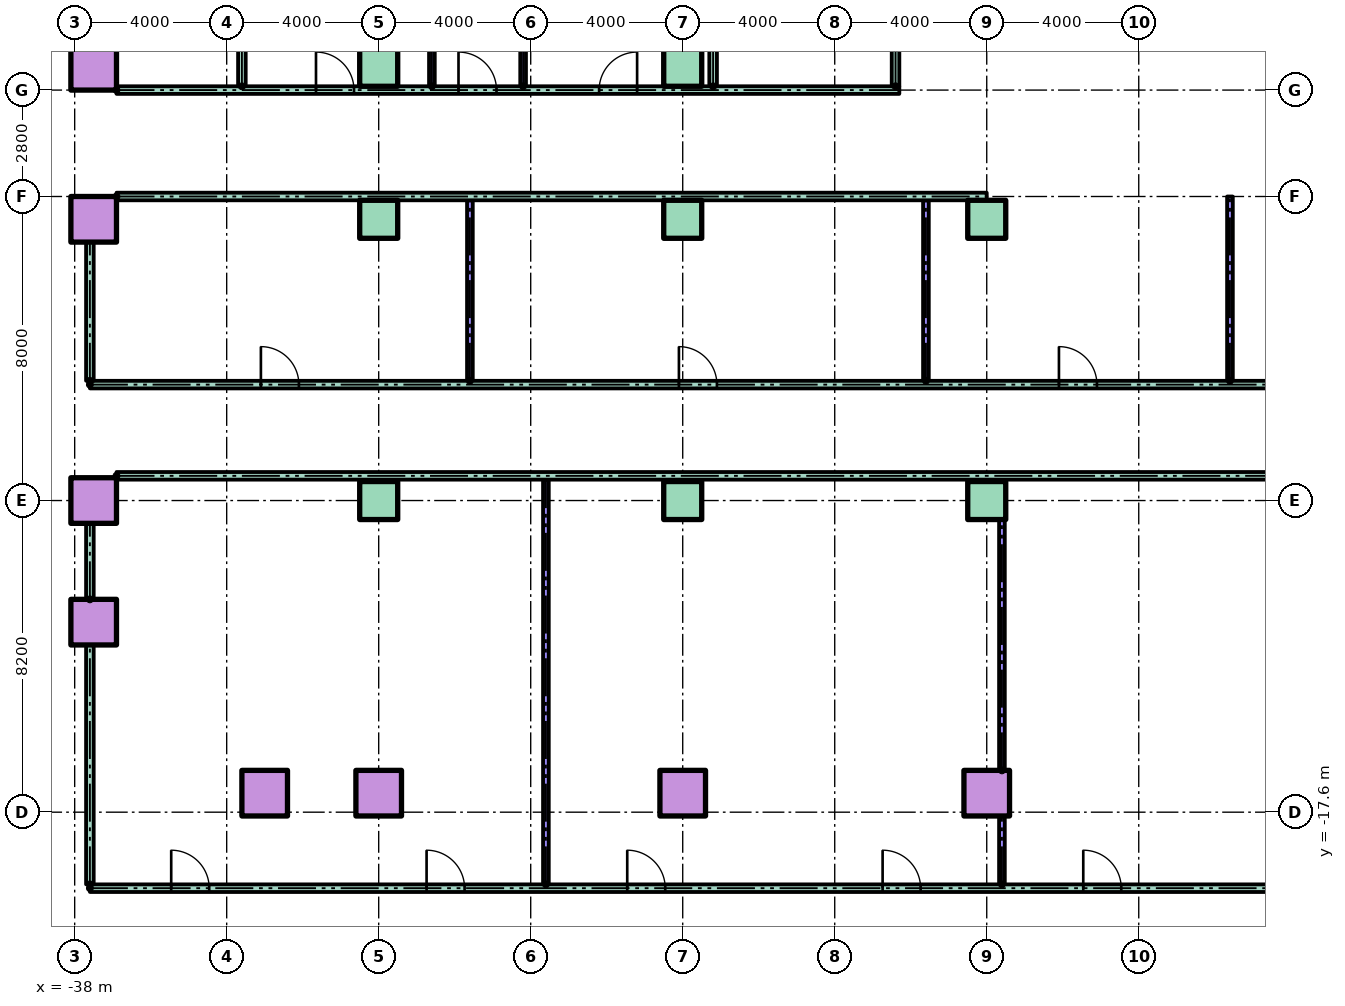
"""IFC4 building model, lengths in metres.
Left out: names, types, materials, properties, quantities, classifications, styles, units other than length and angle.
Written with IfcOpenShell. Run it as: python <this file> out.ifc"""

import sys

from ifc_helpers import new_model, si_unit, direction, frame, frame_2d, origin, origin_2d, place, context, subcontext, project, spatial, rectangle, hollow_rectangle, extrude, element, fill, save


model = new_model("IFC4")
c1 = context("Model", 3, precision=1e-05, world=origin(), true_north=direction((0.0, 1.0)))
c2 = subcontext(c1, "Body", "Model", "MODEL_VIEW")
j1 = project(units=[si_unit("LENGTHUNIT", "METRE"), si_unit("PLANEANGLEUNIT", "RADIAN")], contexts=[c1])
p1 = place(None, origin())
s1 = spatial("IfcSite", under=j1, at=p1, CompositionType="ELEMENT")
p2 = place(p1, origin())
s2 = spatial("IfcBuilding", under=s1, at=p2, CompositionType="ELEMENT")
p3 = place(p2, frame((0.0, 0.0, 14.0)))
s3 = spatial("IfcBuildingStorey", under=s2, at=p3, CompositionType="ELEMENT", Elevation=14.0)
for number, where in (
    (1, (-33.0, -17.1, 0.0)),
    (2, (-30.0, -17.1, 0.0)),
    (3, (-22.0, -17.1, 0.0)),
    (4, (-14.0, -17.1, 0.0)),
    (5, (-37.5, -12.6, 0.0)),
    (6, (-37.5, -9.4, 0.0)),
):
    element("IfcColumn", number, at=place(p3, frame(where)), inside=s3, PredefinedType="COLUMN", context=c2, shape_type="SweptSolid", body=[
        extrude(hollow_rectangle(XDim=1.2, YDim=1.2, WallThickness=0.06, at=origin_2d()), origin(), (0.0, 0.0, 1.0), 4.0),
    ])
for number, where in (
    (7, (-30.0, -9.4, 0.0)),
    (8, (-22.0, -9.4, 0.0)),
    (9, (-14.0, -9.4, 0.0)),
):
    element("IfcColumn", number, at=place(p3, frame(where)), inside=s3, PredefinedType="COLUMN", context=c2, shape_type="SweptSolid", body=[
        extrude(rectangle(XDim=1.0, YDim=1.0, at=origin_2d()), origin(), (0.0, 0.0, 1.0), 4.0),
    ])
p4 = place(p3, frame((-37.5, -2.0, 0.0)))
e10 = element("IfcColumn", 10, at=p4, inside=s3, PredefinedType="COLUMN", context=c2, shape_type="SweptSolid", body=[
    extrude(hollow_rectangle(XDim=1.2, YDim=1.2, WallThickness=0.06, at=origin_2d()), origin(), (0.0, 0.0, 1.0), 4.0),
])
for number, where in (
    (11, (-30.0, -2.0, 0.0)),
    (12, (-22.0, -2.0, 0.0)),
    (13, (-14.0, -2.0, 0.0)),
):
    element("IfcColumn", number, at=place(p3, frame(where)), inside=s3, PredefinedType="COLUMN", context=c2, shape_type="SweptSolid", body=[
        extrude(rectangle(XDim=1.0, YDim=1.0, at=origin_2d()), origin(), (0.0, 0.0, 1.0), 4.0),
    ])
p5 = place(p3, frame((-37.5, 2.0, 0.0)))
e14 = element("IfcColumn", 14, at=p5, inside=s3, PredefinedType="COLUMN", context=c2, shape_type="SweptSolid", body=[
    extrude(hollow_rectangle(XDim=1.2, YDim=1.2, WallThickness=0.06, at=origin_2d()), origin(), (0.0, 0.0, 1.0), 4.0),
])
for number, where in (
    (15, (-30.0, 2.0, 0.0)),
    (16, (-22.0, 2.0, 0.0)),
):
    element("IfcColumn", number, at=place(p3, frame(where)), inside=s3, PredefinedType="COLUMN", context=c2, shape_type="SweptSolid", body=[
        extrude(rectangle(XDim=1.0, YDim=1.0, at=origin_2d()), origin(), (0.0, 0.0, 1.0), 4.0),
    ])
p6 = place(p3, frame((-37.6, -19.6, 0.0)))
e17 = element("IfcWall", 17, at=p6, inside=s3, PredefinedType="PARTITIONING", context=c2, shape_type="SweptSolid", body=[
    extrude(rectangle(XDim=75.2, YDim=0.2, at=frame_2d((37.6, 0.0))), origin(), (0.0, 0.0, 1.0), 3.7),
])
p7 = place(p6, frame((2.14, 0.0, 0.0)))
e18 = element("IfcOpeningElement", 18, at=p7, cuts=e17, PredefinedType="OPENING", context=c2, shape_type="SweptSolid", body=[
    extrude(rectangle(XDim=1.0, YDim=2.1, at=frame_2d((0.5, 1.05))), frame((0.0, 0.11, 0.0), z_axis=(0.0, -1.0, 0.0), x_axis=(1.0, 0.0, 0.0)), (0.0, 0.0, 1.0), 0.22),
])
p8 = place(p6, frame((8.86, 0.0, 0.0)))
e19 = element("IfcOpeningElement", 19, at=p8, cuts=e17, PredefinedType="OPENING", context=c2, shape_type="SweptSolid", body=[
    extrude(rectangle(XDim=1.0, YDim=2.1, at=frame_2d((0.5, 1.05))), frame((0.0, 0.11, 0.0), z_axis=(0.0, -1.0, 0.0), x_axis=(1.0, 0.0, 0.0)), (0.0, 0.0, 1.0), 0.22),
])
p9 = place(p6, frame((14.14, 0.0, 0.0)))
e20 = element("IfcOpeningElement", 20, at=p9, cuts=e17, PredefinedType="OPENING", context=c2, shape_type="SweptSolid", body=[
    extrude(rectangle(XDim=1.0, YDim=2.1, at=frame_2d((0.5, 1.05))), frame((0.0, 0.11, 0.0), z_axis=(0.0, -1.0, 0.0), x_axis=(1.0, 0.0, 0.0)), (0.0, 0.0, 1.0), 0.22),
])
p10 = place(p6, frame((20.86, 0.0, 0.0)))
e21 = element("IfcOpeningElement", 21, at=p10, cuts=e17, PredefinedType="OPENING", context=c2, shape_type="SweptSolid", body=[
    extrude(rectangle(XDim=1.0, YDim=2.1, at=frame_2d((0.5, 1.05))), frame((0.0, 0.11, 0.0), z_axis=(0.0, -1.0, 0.0), x_axis=(1.0, 0.0, 0.0)), (0.0, 0.0, 1.0), 0.22),
])
p11 = place(p6, frame((26.14, 0.0, 0.0)))
e22 = element("IfcOpeningElement", 22, at=p11, cuts=e17, PredefinedType="OPENING", context=c2, shape_type="SweptSolid", body=[
    extrude(rectangle(XDim=1.0, YDim=2.1, at=frame_2d((0.5, 1.05))), frame((0.0, 0.11, 0.0), z_axis=(0.0, -1.0, 0.0), x_axis=(1.0, 0.0, 0.0)), (0.0, 0.0, 1.0), 0.22),
])
p12 = place(p6, frame((32.86, 0.0, 0.0)))
e23 = element("IfcOpeningElement", 23, at=p12, cuts=e17, PredefinedType="OPENING", context=c2, shape_type="SweptSolid", body=[
    extrude(rectangle(XDim=1.0, YDim=2.1, at=frame_2d((0.5, 1.05))), frame((0.0, 0.11, 0.0), z_axis=(0.0, -1.0, 0.0), x_axis=(1.0, 0.0, 0.0)), (0.0, 0.0, 1.0), 0.22),
])
p13 = place(p6, frame((39.85, 0.0, 0.0)))
e24 = element("IfcOpeningElement", 24, at=p13, cuts=e17, PredefinedType="OPENING", context=c2, shape_type="SweptSolid", body=[
    extrude(rectangle(XDim=0.9, YDim=2.1, at=frame_2d((0.45, 1.05))), frame((0.0, 0.11, 0.0), z_axis=(0.0, -1.0, 0.0), x_axis=(1.0, 0.0, 0.0)), (0.0, 0.0, 1.0), 0.22),
])
p14 = place(p6, frame((50.1, 0.0, 0.0)))
e25 = element("IfcOpeningElement", 25, at=p14, cuts=e17, PredefinedType="OPENING", context=c2, shape_type="SweptSolid", body=[
    extrude(rectangle(XDim=1.0, YDim=2.1, at=frame_2d((0.5, 1.05))), frame((0.0, 0.11, 0.0), z_axis=(0.0, -1.0, 0.0), x_axis=(1.0, 0.0, 0.0)), (0.0, 0.0, 1.0), 0.22),
])
p15 = place(p6, frame((61.1, 0.0, 0.0)))
e26 = element("IfcOpeningElement", 26, at=p15, cuts=e17, PredefinedType="OPENING", context=c2, shape_type="SweptSolid", body=[
    extrude(rectangle(XDim=1.0, YDim=2.1, at=frame_2d((0.5, 1.05))), frame((0.0, 0.11, 0.0), z_axis=(0.0, -1.0, 0.0), x_axis=(1.0, 0.0, 0.0)), (0.0, 0.0, 1.0), 0.22),
])
p16 = place(p3, frame((-36.9, -8.75, 0.0)))
e27 = element("IfcWall", 27, at=p16, inside=s3, PredefinedType="PARTITIONING", context=c2, shape_type="SweptSolid", body=[
    extrude(rectangle(XDim=73.8, YDim=0.2, at=frame_2d((36.9, 0.0))), origin(), (0.0, 0.0, 1.0), 3.7),
])
p17 = place(p3, frame((-37.6, -6.35, 0.0)))
e28 = element("IfcWall", 28, at=p17, inside=s3, PredefinedType="PARTITIONING", context=c2, shape_type="SweptSolid", body=[
    extrude(rectangle(XDim=75.2, YDim=0.2, at=frame_2d((37.6, 0.0))), origin(), (0.0, 0.0, 1.0), 3.7),
])
p18 = place(p17, frame((4.5, 0.0, 0.0)))
e29 = element("IfcOpeningElement", 29, at=p18, cuts=e28, PredefinedType="OPENING", context=c2, shape_type="SweptSolid", body=[
    extrude(rectangle(XDim=1.0, YDim=2.1, at=frame_2d((0.5, 1.05))), frame((0.0, 0.11, 0.0), z_axis=(0.0, -1.0, 0.0), x_axis=(1.0, 0.0, 0.0)), (0.0, 0.0, 1.0), 0.22),
])
p19 = place(p17, frame((15.5, 0.0, 0.0)))
e30 = element("IfcOpeningElement", 30, at=p19, cuts=e28, PredefinedType="OPENING", context=c2, shape_type="SweptSolid", body=[
    extrude(rectangle(XDim=1.0, YDim=2.1, at=frame_2d((0.5, 1.05))), frame((0.0, 0.11, 0.0), z_axis=(0.0, -1.0, 0.0), x_axis=(1.0, 0.0, 0.0)), (0.0, 0.0, 1.0), 0.22),
])
p20 = place(p17, frame((25.5, 0.0, 0.0)))
e31 = element("IfcOpeningElement", 31, at=p20, cuts=e28, PredefinedType="OPENING", context=c2, shape_type="SweptSolid", body=[
    extrude(rectangle(XDim=1.0, YDim=2.1, at=frame_2d((0.5, 1.05))), frame((0.0, 0.11, 0.0), z_axis=(0.0, -1.0, 0.0), x_axis=(1.0, 0.0, 0.0)), (0.0, 0.0, 1.0), 0.22),
])
p21 = place(p17, frame((34.55, 0.0, 0.0)))
e32 = element("IfcOpeningElement", 32, at=p21, cuts=e28, PredefinedType="OPENING", context=c2, shape_type="SweptSolid", body=[
    extrude(rectangle(XDim=0.9, YDim=2.1, at=frame_2d((0.45, 1.05))), frame((0.0, 0.11, 0.0), z_axis=(0.0, -1.0, 0.0), x_axis=(1.0, 0.0, 0.0)), (0.0, 0.0, 1.0), 0.22),
])
p22 = place(p17, frame((44.604, 0.0, 0.0)))
e33 = element("IfcOpeningElement", 33, at=p22, cuts=e28, PredefinedType="OPENING", context=c2, shape_type="SweptSolid", body=[
    extrude(rectangle(XDim=1.0, YDim=2.1, at=frame_2d((0.5, 1.05))), frame((0.0, 0.11, 0.0), z_axis=(0.0, -1.0, 0.0), x_axis=(1.0, 0.0, 0.0)), (0.0, 0.0, 1.0), 0.22),
])
p23 = place(p17, frame((57.596, 0.0, 0.0)))
e34 = element("IfcOpeningElement", 34, at=p23, cuts=e28, PredefinedType="OPENING", context=c2, shape_type="SweptSolid", body=[
    extrude(rectangle(XDim=1.0, YDim=2.1, at=frame_2d((0.5, 1.05))), frame((0.0, 0.11, 0.0), z_axis=(0.0, -1.0, 0.0), x_axis=(1.0, 0.0, 0.0)), (0.0, 0.0, 1.0), 0.22),
])
p24 = place(p17, frame((68.7, 0.0, 0.0)))
e35 = element("IfcOpeningElement", 35, at=p24, cuts=e28, PredefinedType="OPENING", context=c2, shape_type="SweptSolid", body=[
    extrude(rectangle(XDim=1.0, YDim=2.1, at=frame_2d((0.5, 1.05))), frame((0.0, 0.11, 0.0), z_axis=(0.0, -1.0, 0.0), x_axis=(1.0, 0.0, 0.0)), (0.0, 0.0, 1.0), 0.22),
])
p25 = place(p3, frame((-36.9, -1.4, 0.0)))
e36 = element("IfcWall", 36, at=p25, inside=s3, PredefinedType="PARTITIONING", context=c2, shape_type="SweptSolid", body=[
    extrude(rectangle(XDim=22.9, YDim=0.2, at=frame_2d((11.45, 0.0))), origin(), (0.0, 0.0, 1.0), 3.7),
])
p26 = place(p3, frame((-36.9, 1.4, 0.0)))
e37 = element("IfcWall", 37, at=p26, inside=s3, PredefinedType="PARTITIONING", context=c2, shape_type="SweptSolid", body=[
    extrude(rectangle(XDim=20.6, YDim=0.2, at=frame_2d((10.3, 0.0))), origin(), (0.0, 0.0, 1.0), 3.7),
])
p27 = place(p26, frame((5.25, 0.0, 0.0)))
e38 = element("IfcOpeningElement", 38, at=p27, cuts=e37, PredefinedType="OPENING", context=c2, shape_type="SweptSolid", body=[
    extrude(rectangle(XDim=1.0, YDim=2.1, at=frame_2d((0.5, 1.05))), frame((0.0, 0.11, 0.0), z_axis=(0.0, -1.0, 0.0), x_axis=(1.0, 0.0, 0.0)), (0.0, 0.0, 1.0), 0.22),
])
p28 = place(p26, frame((9.0, 0.0, 0.0)))
e39 = element("IfcOpeningElement", 39, at=p28, cuts=e37, PredefinedType="OPENING", context=c2, shape_type="SweptSolid", body=[
    extrude(rectangle(XDim=1.0, YDim=2.1, at=frame_2d((0.5, 1.05))), frame((0.0, 0.11, 0.0), z_axis=(0.0, -1.0, 0.0), x_axis=(1.0, 0.0, 0.0)), (0.0, 0.0, 1.0), 0.22),
])
p29 = place(p26, frame((12.7, 0.0, 0.0)))
e40 = element("IfcOpeningElement", 40, at=p29, cuts=e37, PredefinedType="OPENING", context=c2, shape_type="SweptSolid", body=[
    extrude(rectangle(XDim=1.0, YDim=2.1, at=frame_2d((0.5, 1.05))), frame((0.0, 0.11, 0.0), z_axis=(0.0, -1.0, 0.0), x_axis=(1.0, 0.0, 0.0)), (0.0, 0.0, 1.0), 0.22),
])
p30 = place(p3, frame((-37.6, -19.5, 0.0), z_axis=(0.0, 0.0, 1.0), x_axis=(0.0, 1.0, 0.0)))
e41 = element("IfcWall", 41, at=p30, inside=s3, PredefinedType="PARTITIONING", context=c2, shape_type="SweptSolid", body=[
    extrude(rectangle(XDim=6.3, YDim=0.2, at=frame_2d((3.15, 0.0))), origin(), (0.0, 0.0, 1.0), 3.7),
])
p31 = place(p3, frame((-37.6, -12.0, 0.0), z_axis=(0.0, 0.0, 1.0), x_axis=(0.0, 1.0, 0.0)))
e42 = element("IfcWall", 42, at=p31, inside=s3, PredefinedType="PARTITIONING", context=c2, shape_type="SweptSolid", body=[
    extrude(rectangle(XDim=2.0, YDim=0.2, at=frame_2d((1.0, 0.0))), origin(), (0.0, 0.0, 1.0), 3.7),
])
p32 = place(p3, frame((-37.6, -6.25, 0.0), z_axis=(0.0, 0.0, 1.0), x_axis=(0.0, 1.0, 0.0)))
e43 = element("IfcWall", 43, at=p32, inside=s3, PredefinedType="PARTITIONING", context=c2, shape_type="SweptSolid", body=[
    extrude(rectangle(XDim=3.65, YDim=0.2, at=frame_2d((1.825, 0.0))), origin(), (0.0, 0.0, 1.0), 3.7),
])
p33 = place(p3, frame((-33.6, 1.5, 0.0), z_axis=(0.0, 0.0, 1.0), x_axis=(0.0, 1.0, 0.0)))
e44 = element("IfcWall", 44, at=p33, inside=s3, PredefinedType="PARTITIONING", context=c2, shape_type="SweptSolid", body=[
    extrude(rectangle(XDim=7.0, YDim=0.2, at=frame_2d((3.5, 0.0))), origin(), (0.0, 0.0, 1.0), 3.7),
])
p34 = place(p3, frame((-28.6, 1.5, 0.0), z_axis=(0.0, 0.0, 1.0), x_axis=(0.0, 1.0, 0.0)))
e45 = element("IfcWall", 45, at=p34, inside=s3, PredefinedType="PARTITIONING", context=c2, shape_type="SweptSolid", body=[
    extrude(rectangle(XDim=7.0, YDim=0.15, at=frame_2d((3.5, 0.0))), origin(), (0.0, 0.0, 1.0), 3.7),
])
p35 = place(p3, frame((-27.6, -6.25, 0.0), z_axis=(0.0, 0.0, 1.0), x_axis=(0.0, 1.0, 0.0)))
e46 = element("IfcWall", 46, at=p35, inside=s3, PredefinedType="PARTITIONING", context=c2, shape_type="SweptSolid", body=[
    extrude(rectangle(XDim=4.75, YDim=0.15, at=frame_2d((2.375, 0.0))), origin(), (0.0, 0.0, 1.0), 3.7),
])
p36 = place(p3, frame((-26.2, 1.5, 0.0), z_axis=(0.0, 0.0, 1.0), x_axis=(0.0, 1.0, 0.0)))
e47 = element("IfcWall", 47, at=p36, inside=s3, PredefinedType="PARTITIONING", context=c2, shape_type="SweptSolid", body=[
    extrude(rectangle(XDim=7.0, YDim=0.15, at=frame_2d((3.5, 0.0))), origin(), (0.0, 0.0, 1.0), 3.7),
])
p37 = place(p3, frame((-25.6, -19.5, 0.0), z_axis=(0.0, 0.0, 1.0), x_axis=(0.0, 1.0, 0.0)))
e48 = element("IfcWall", 48, at=p37, inside=s3, PredefinedType="PARTITIONING", context=c2, shape_type="SweptSolid", body=[
    extrude(rectangle(XDim=10.65, YDim=0.15, at=frame_2d((5.325, 0.0))), origin(), (0.0, 0.0, 1.0), 3.7),
])
p38 = place(p3, frame((-21.2, 1.5, 0.0), z_axis=(0.0, 0.0, 1.0), x_axis=(0.0, 1.0, 0.0)))
e49 = element("IfcWall", 49, at=p38, inside=s3, PredefinedType="PARTITIONING", context=c2, shape_type="SweptSolid", body=[
    extrude(rectangle(XDim=7.0, YDim=0.2, at=frame_2d((3.5, 0.0))), origin(), (0.0, 0.0, 1.0), 3.7),
])
p39 = place(p3, frame((-16.4, 1.5, 0.0), z_axis=(0.0, 0.0, 1.0), x_axis=(0.0, 1.0, 0.0)))
e50 = element("IfcWall", 50, at=p39, inside=s3, PredefinedType="PARTITIONING", context=c2, shape_type="SweptSolid", body=[
    extrude(rectangle(XDim=7.0, YDim=0.2, at=frame_2d((3.5, 0.0))), origin(), (0.0, 0.0, 1.0), 3.7),
])
p40 = place(p39, frame((3.05, 0.0, 0.0)))
e51 = element("IfcOpeningElement", 51, at=p40, cuts=e50, PredefinedType="OPENING", context=c2, shape_type="SweptSolid", body=[
    extrude(rectangle(XDim=0.9, YDim=2.1, at=frame_2d((0.45, 1.05))), frame((0.0, 0.11, 0.0), z_axis=(0.0, -1.0, 0.0), x_axis=(1.0, 0.0, 0.0)), (0.0, 0.0, 1.0), 0.22),
])
p41 = place(p3, frame((-15.6, -6.25, 0.0), z_axis=(0.0, 0.0, 1.0), x_axis=(0.0, 1.0, 0.0)))
e52 = element("IfcWall", 52, at=p41, inside=s3, PredefinedType="PARTITIONING", context=c2, shape_type="SweptSolid", body=[
    extrude(rectangle(XDim=4.75, YDim=0.15, at=frame_2d((2.375, 0.0))), origin(), (0.0, 0.0, 1.0), 3.7),
])
p42 = place(p3, frame((-13.6, -19.5, 0.0), z_axis=(0.0, 0.0, 1.0), x_axis=(0.0, 1.0, 0.0)))
e53 = element("IfcWall", 53, at=p42, inside=s3, PredefinedType="PARTITIONING", context=c2, shape_type="SweptSolid", body=[
    extrude(rectangle(XDim=1.8, YDim=0.15, at=frame_2d((0.9, 0.0))), origin(), (0.0, 0.0, 1.0), 3.7),
])
p43 = place(p3, frame((-13.6, -16.5, 0.0), z_axis=(0.0, 0.0, 1.0), x_axis=(0.0, 1.0, 0.0)))
e54 = element("IfcWall", 54, at=p43, inside=s3, PredefinedType="PARTITIONING", context=c2, shape_type="SweptSolid", body=[
    extrude(rectangle(XDim=6.6, YDim=0.15, at=frame_2d((3.3, 0.0))), origin(), (0.0, 0.0, 1.0), 3.7),
])
p44 = place(p3, frame((-7.6, -6.25, 0.0), z_axis=(0.0, 0.0, 1.0), x_axis=(0.0, 1.0, 0.0)))
e55 = element("IfcWall", 55, at=p44, inside=s3, PredefinedType="PARTITIONING", context=c2, shape_type="SweptSolid", body=[
    extrude(rectangle(XDim=4.85, YDim=0.15, at=frame_2d((2.425, 0.0))), origin(), (0.0, 0.0, 1.0), 3.7),
])
p45 = place(p7, origin())
e56 = element("IfcDoor", 56, at=p45, inside=s3, OperationType="SINGLE_SWING_LEFT", PredefinedType="DOOR", context=c2, shape_type="SweptSolid", body=[
    extrude(rectangle(XDim=1.0, YDim=2.1, at=frame_2d((0.5, 1.05))), frame((0.0, 0.025, 0.0), z_axis=(0.0, -1.0, 0.0), x_axis=(1.0, 0.0, 0.0)), (0.0, 0.0, 1.0), 0.05),
])
fill(e18, e56)
p46 = place(p8, origin())
e57 = element("IfcDoor", 57, at=p46, inside=s3, OperationType="SINGLE_SWING_LEFT", PredefinedType="DOOR", context=c2, shape_type="SweptSolid", body=[
    extrude(rectangle(XDim=1.0, YDim=2.1, at=frame_2d((0.5, 1.05))), frame((0.0, 0.025, 0.0), z_axis=(0.0, -1.0, 0.0), x_axis=(1.0, 0.0, 0.0)), (0.0, 0.0, 1.0), 0.05),
])
fill(e19, e57)
p47 = place(p9, origin())
e58 = element("IfcDoor", 58, at=p47, inside=s3, OperationType="SINGLE_SWING_LEFT", PredefinedType="DOOR", context=c2, shape_type="SweptSolid", body=[
    extrude(rectangle(XDim=1.0, YDim=2.1, at=frame_2d((0.5, 1.05))), frame((0.0, 0.025, 0.0), z_axis=(0.0, -1.0, 0.0), x_axis=(1.0, 0.0, 0.0)), (0.0, 0.0, 1.0), 0.05),
])
fill(e20, e58)
p48 = place(p10, origin())
e59 = element("IfcDoor", 59, at=p48, inside=s3, OperationType="SINGLE_SWING_LEFT", PredefinedType="DOOR", context=c2, shape_type="SweptSolid", body=[
    extrude(rectangle(XDim=1.0, YDim=2.1, at=frame_2d((0.5, 1.05))), frame((0.0, 0.025, 0.0), z_axis=(0.0, -1.0, 0.0), x_axis=(1.0, 0.0, 0.0)), (0.0, 0.0, 1.0), 0.05),
])
fill(e21, e59)
p49 = place(p11, origin())
e60 = element("IfcDoor", 60, at=p49, inside=s3, OperationType="SINGLE_SWING_LEFT", PredefinedType="DOOR", context=c2, shape_type="SweptSolid", body=[
    extrude(rectangle(XDim=1.0, YDim=2.1, at=frame_2d((0.5, 1.05))), frame((0.0, 0.025, 0.0), z_axis=(0.0, -1.0, 0.0), x_axis=(1.0, 0.0, 0.0)), (0.0, 0.0, 1.0), 0.05),
])
fill(e22, e60)
p50 = place(p18, origin())
e61 = element("IfcDoor", 61, at=p50, inside=s3, OperationType="SINGLE_SWING_LEFT", PredefinedType="DOOR", context=c2, shape_type="SweptSolid", body=[
    extrude(rectangle(XDim=1.0, YDim=2.1, at=frame_2d((0.5, 1.05))), frame((0.0, 0.025, 0.0), z_axis=(0.0, -1.0, 0.0), x_axis=(1.0, 0.0, 0.0)), (0.0, 0.0, 1.0), 0.05),
])
fill(e29, e61)
p51 = place(p19, origin())
e62 = element("IfcDoor", 62, at=p51, inside=s3, OperationType="SINGLE_SWING_LEFT", PredefinedType="DOOR", context=c2, shape_type="SweptSolid", body=[
    extrude(rectangle(XDim=1.0, YDim=2.1, at=frame_2d((0.5, 1.05))), frame((0.0, 0.025, 0.0), z_axis=(0.0, -1.0, 0.0), x_axis=(1.0, 0.0, 0.0)), (0.0, 0.0, 1.0), 0.05),
])
fill(e30, e62)
p52 = place(p20, origin())
e63 = element("IfcDoor", 63, at=p52, inside=s3, OperationType="SINGLE_SWING_LEFT", PredefinedType="DOOR", context=c2, shape_type="SweptSolid", body=[
    extrude(rectangle(XDim=1.0, YDim=2.1, at=frame_2d((0.5, 1.05))), frame((0.0, 0.025, 0.0), z_axis=(0.0, -1.0, 0.0), x_axis=(1.0, 0.0, 0.0)), (0.0, 0.0, 1.0), 0.05),
])
fill(e31, e63)
p53 = place(p27, origin())
e64 = element("IfcDoor", 64, at=p53, inside=s3, OperationType="SINGLE_SWING_LEFT", PredefinedType="DOOR", context=c2, shape_type="SweptSolid", body=[
    extrude(rectangle(XDim=1.0, YDim=2.1, at=frame_2d((0.5, 1.05))), frame((0.0, 0.025, 0.0), z_axis=(0.0, -1.0, 0.0), x_axis=(1.0, 0.0, 0.0)), (0.0, 0.0, 1.0), 0.05),
])
fill(e38, e64)
p54 = place(p28, origin())
e65 = element("IfcDoor", 65, at=p54, inside=s3, OperationType="SINGLE_SWING_LEFT", PredefinedType="DOOR", context=c2, shape_type="SweptSolid", body=[
    extrude(rectangle(XDim=1.0, YDim=2.1, at=frame_2d((0.5, 1.05))), frame((0.0, 0.025, 0.0), z_axis=(0.0, -1.0, 0.0), x_axis=(1.0, 0.0, 0.0)), (0.0, 0.0, 1.0), 0.05),
])
fill(e39, e65)
p55 = place(p29, origin())
e66 = element("IfcDoor", 66, at=p55, inside=s3, OperationType="SINGLE_SWING_RIGHT", PredefinedType="DOOR", context=c2, shape_type="SweptSolid", body=[
    extrude(rectangle(XDim=1.0, YDim=2.1, at=frame_2d((0.5, 1.05))), frame((0.0, 0.025, 0.0), z_axis=(0.0, -1.0, 0.0), x_axis=(1.0, 0.0, 0.0)), (0.0, 0.0, 1.0), 0.05),
])
fill(e40, e66)
save(model, sys.argv[1])
